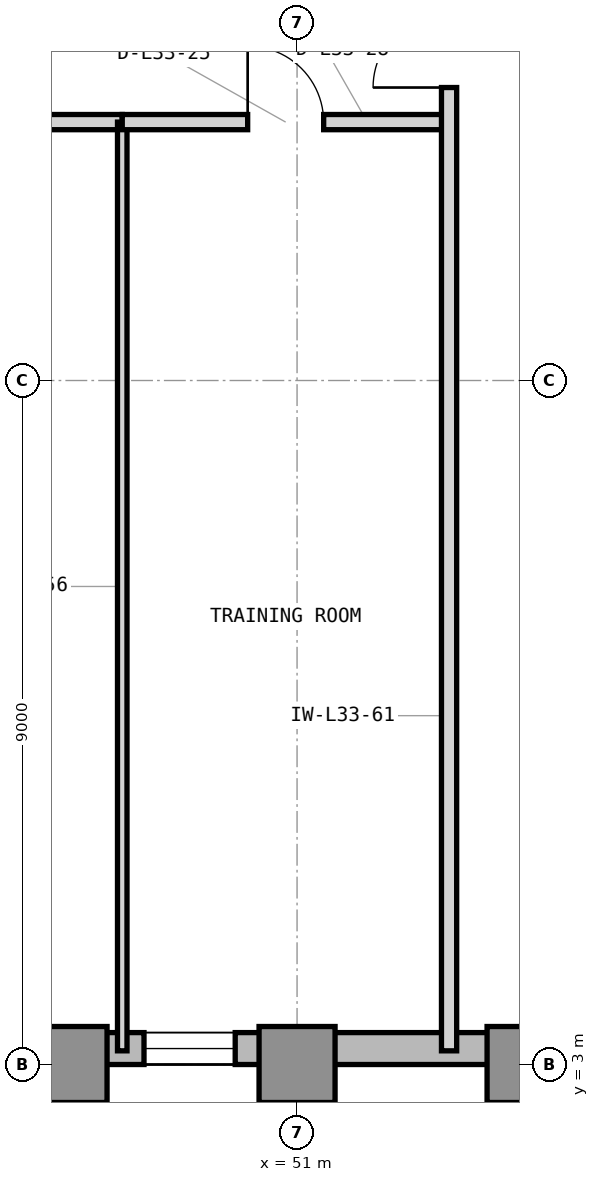
"""IFC4 building model, lengths in metres.
Left out: names, types, materials, properties, quantities, classifications, styles, units other than length and angle.
Written with IfcOpenShell. Run it as: python <this file> out.ifc"""

import sys

from ifc_helpers import new_model, si_unit, direction, frame, frame_2d, origin, origin_2d, place, context, subcontext, project, spatial, rectangle, extrude, element, fill, save


model = new_model("IFC4")
c1 = context("Model", 3, precision=1e-05, world=origin(), true_north=direction((0.0, 1.0)))
c2 = subcontext(c1, "Body", "Model", "MODEL_VIEW")
j1 = project(units=[si_unit("LENGTHUNIT", "METRE"), si_unit("PLANEANGLEUNIT", "RADIAN")], contexts=[c1])
p1 = place(None, origin())
s1 = spatial("IfcSite", under=j1, at=p1, CompositionType="ELEMENT")
p2 = place(p1, origin())
s2 = spatial("IfcBuilding", under=s1, at=p2, CompositionType="ELEMENT")
p3 = place(p2, frame((0.0, 0.0, 140.1)))
s3 = spatial("IfcBuildingStorey", under=s2, at=p3, CompositionType="ELEMENT", Elevation=140.1)
for number, where, z_axis, x_axis in (
    (1, (48.0, 3.0, 0.0), (0.0, 0.0, 1.0), (1.0, 0.0, 0.0)),
    (2, (51.0, 3.0, 0.0), (0.0, 0.0, 1.0), (1.0, 0.0, 0.0)),
    (3, (54.0, 3.0, 0.0), (0.0, 0.0, 1.0), (1.0, 0.0, 0.0)),
):
    element("IfcColumn", number, at=place(p3, frame(where, z_axis=z_axis, x_axis=x_axis)), inside=s3, PredefinedType="COLUMN", context=c2, shape_type="SweptSolid", body=[
        extrude(rectangle(XDim=1.0, YDim=1.0, at=origin_2d()), origin(), (0.0, 0.0, 1.0), 3.9),
    ])
p4 = place(p3, frame((23.9, 3.21, 0.0), z_axis=(0.0, 0.0, 1.0), x_axis=(1.0, 0.0, 0.0)))
e4 = element("IfcWall", 4, at=p4, inside=s3, PredefinedType="STANDARD", context=c2, shape_type="SweptSolid", body=[
    extrude(rectangle(XDim=34.5, YDim=0.42, at=frame_2d((17.25, 0.0))), origin(), (0.0, 0.0, 1.0), 3.7),
])
p5 = place(p4, frame((11.071, 0.0, 0.85)))
e5 = element("IfcOpeningElement", 5, at=p5, cuts=e4, PredefinedType="OPENING", context=c2, shape_type="SweptSolid", body=[
    extrude(rectangle(XDim=2.5, YDim=2.25, at=frame_2d((1.25, 1.125))), frame((0.0, 0.22, 0.0), z_axis=(0.0, -1.0, 0.0), x_axis=(1.0, 0.0, 0.0)), (0.0, 0.0, 1.0), 0.44),
])
p6 = place(p4, frame((1.1, 0.0, 0.85)))
e6 = element("IfcOpeningElement", 6, at=p6, cuts=e4, PredefinedType="OPENING", context=c2, shape_type="SweptSolid", body=[
    extrude(rectangle(XDim=1.2, YDim=2.25, at=frame_2d((0.6, 1.125))), frame((0.0, 0.22, 0.0), z_axis=(0.0, -1.0, 0.0), x_axis=(1.0, 0.0, 0.0)), (0.0, 0.0, 1.0), 0.44),
])
p7 = place(p4, frame((5.036, 0.0, 0.85)))
e7 = element("IfcOpeningElement", 7, at=p7, cuts=e4, PredefinedType="OPENING", context=c2, shape_type="SweptSolid", body=[
    extrude(rectangle(XDim=2.5, YDim=2.25, at=frame_2d((1.25, 1.125))), frame((0.0, 0.22, 0.0), z_axis=(0.0, -1.0, 0.0), x_axis=(1.0, 0.0, 0.0)), (0.0, 0.0, 1.0), 0.44),
])
p8 = place(p4, frame((19.786, 0.0, 0.85)))
e8 = element("IfcOpeningElement", 8, at=p8, cuts=e4, PredefinedType="OPENING", context=c2, shape_type="SweptSolid", body=[
    extrude(rectangle(XDim=2.5, YDim=2.25, at=frame_2d((1.25, 1.125))), frame((0.0, 0.22, 0.0), z_axis=(0.0, -1.0, 0.0), x_axis=(1.0, 0.0, 0.0)), (0.0, 0.0, 1.0), 0.44),
])
p9 = place(p4, frame((25.086, 0.0, 0.85)))
e9 = element("IfcOpeningElement", 9, at=p9, cuts=e4, PredefinedType="OPENING", context=c2, shape_type="SweptSolid", body=[
    extrude(rectangle(XDim=1.2, YDim=2.25, at=frame_2d((0.6, 1.125))), frame((0.0, 0.22, 0.0), z_axis=(0.0, -1.0, 0.0), x_axis=(1.0, 0.0, 0.0)), (0.0, 0.0, 1.0), 0.44),
])
p10 = place(p3, frame((41.2, 15.4, 0.0), z_axis=(0.0, 0.0, 1.0), x_axis=(1.0, 0.0, 0.0)))
e10 = element("IfcWall", 10, at=p10, inside=s3, PredefinedType="PARTITIONING", context=c2, shape_type="SweptSolid", body=[
    extrude(rectangle(XDim=7.5, YDim=0.2, at=frame_2d((3.75, 0.0))), origin(), (0.0, 0.0, 1.0), 3.69),
])
p11 = place(p10, frame((3.0, 0.0, 0.0)))
e11 = element("IfcOpeningElement", 11, at=p11, cuts=e10, PredefinedType="OPENING", context=c2, shape_type="SweptSolid", body=[
    extrude(rectangle(XDim=1.5, YDim=2.3, at=frame_2d((0.75, 1.15))), frame((0.0, 0.11, 0.0), z_axis=(0.0, -1.0, 0.0), x_axis=(1.0, 0.0, 0.0)), (0.0, 0.0, 1.0), 0.22),
])
p12 = place(p3, frame((48.7, 3.18, 0.0), z_axis=(0.0, 0.0, 1.0), x_axis=(0.0, 1.0, 0.0)))
e12 = element("IfcWall", 12, at=p12, inside=s3, PredefinedType="PARTITIONING", context=c2, shape_type="SweptSolid", body=[
    extrude(rectangle(XDim=12.22, YDim=0.125, at=frame_2d((6.11, 0.0))), origin(), (0.0, 0.0, 1.0), 3.69),
])
p13 = place(p3, frame((48.7, 15.4, 0.0), z_axis=(0.0, 0.0, 1.0), x_axis=(1.0, 0.0, 0.0)))
e13 = element("IfcWall", 13, at=p13, inside=s3, PredefinedType="PARTITIONING", context=c2, shape_type="SweptSolid", body=[
    extrude(rectangle(XDim=4.3, YDim=0.2, at=frame_2d((2.15, 0.0))), origin(), (0.0, 0.0, 1.0), 3.69),
])
p14 = place(p13, frame((1.65, 0.0, 0.0)))
e14 = element("IfcOpeningElement", 14, at=p14, cuts=e13, PredefinedType="OPENING", context=c2, shape_type="SweptSolid", body=[
    extrude(rectangle(XDim=1.0, YDim=2.15, at=frame_2d((0.5, 1.075))), frame((0.0, 0.11, 0.0), z_axis=(0.0, -1.0, 0.0), x_axis=(1.0, 0.0, 0.0)), (0.0, 0.0, 1.0), 0.22),
])
p15 = place(p3, frame((53.0, 3.18, 0.0), z_axis=(0.0, 0.0, 1.0), x_axis=(0.0, 1.0, 0.0)))
e15 = element("IfcWall", 15, at=p15, inside=s3, PredefinedType="PARTITIONING", context=c2, shape_type="SweptSolid", body=[
    extrude(rectangle(XDim=17.64, YDim=0.2, at=frame_2d((8.82, 0.0))), origin(), (0.0, 0.0, 1.0), 3.69),
])
p16 = place(p15, frame((12.675, 0.0, 0.0)))
e16 = element("IfcOpeningElement", 16, at=p16, cuts=e15, PredefinedType="OPENING", context=c2, shape_type="SweptSolid", body=[
    extrude(rectangle(XDim=1.0, YDim=2.15, at=frame_2d((0.5, 1.075))), frame((0.0, 0.11, 0.0), z_axis=(0.0, -1.0, 0.0), x_axis=(1.0, 0.0, 0.0)), (0.0, 0.0, 1.0), 0.22),
])
p17 = place(p14, origin())
e17 = element("IfcDoor", 17, at=p17, inside=s3, OperationType="SINGLE_SWING_LEFT", PredefinedType="DOOR", context=c2, shape_type="SweptSolid", body=[
    extrude(rectangle(XDim=1.0, YDim=2.15, at=frame_2d((0.5, 1.075))), frame((0.0, 0.025, 0.0), z_axis=(0.0, -1.0, 0.0), x_axis=(1.0, 0.0, 0.0)), (0.0, 0.0, 1.0), 0.05),
])
fill(e14, e17)
p18 = place(p16, origin())
e18 = element("IfcDoor", 18, at=p18, inside=s3, OperationType="SINGLE_SWING_LEFT", PredefinedType="DOOR", context=c2, shape_type="SweptSolid", body=[
    extrude(rectangle(XDim=1.0, YDim=2.15, at=frame_2d((0.5, 1.075))), frame((0.0, 0.025, 0.0), z_axis=(0.0, -1.0, 0.0), x_axis=(1.0, 0.0, 0.0)), (0.0, 0.0, 1.0), 0.05),
])
fill(e16, e18)
p19 = place(p9, origin())
e19 = element("IfcWindow", 19, at=p19, inside=s3, PartitioningType="SINGLE_PANEL", PredefinedType="WINDOW", context=c2, shape_type="SweptSolid", body=[
    extrude(rectangle(XDim=1.2, YDim=2.25, at=frame_2d((0.6, 1.125))), frame((0.0, 0.11, 0.0), z_axis=(0.0, -1.0, 0.0), x_axis=(1.0, 0.0, 0.0)), (0.0, 0.0, 1.0), 0.06),
])
fill(e9, e19)
save(model, sys.argv[1])
